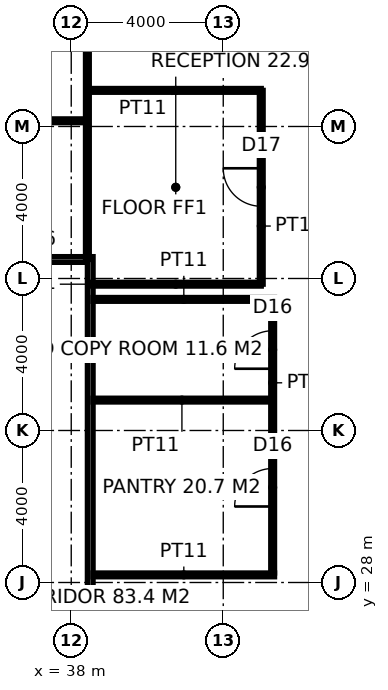
"""IFC4 building model, lengths in metres.
Left out: names, types, materials, properties, quantities, classifications, styles, units other than length and angle.
Written with IfcOpenShell. Run it as: python <this file> out.ifc"""

import sys

from ifc_helpers import new_model, si_unit, direction, frame, frame_2d, origin, place, context, subcontext, project, spatial, rectangle, extrude, element, fill, save


model = new_model("IFC4")
c1 = context("Model", 3, precision=1e-05, world=origin(), true_north=direction((0.0, 1.0)))
c2 = subcontext(c1, "Body", "Model", "MODEL_VIEW")
j1 = project(units=[si_unit("LENGTHUNIT", "METRE"), si_unit("PLANEANGLEUNIT", "RADIAN")], contexts=[c1])
p1 = place(None, origin())
s1 = spatial("IfcSite", under=j1, at=p1, CompositionType="ELEMENT")
p2 = place(p1, origin())
s2 = spatial("IfcBuilding", under=s1, at=p2, CompositionType="ELEMENT")
p3 = place(p2, frame((0.0, 0.0, 214.2)))
s3 = spatial("IfcBuildingStorey", under=s2, at=p3, CompositionType="ELEMENT", Elevation=214.2)
p4 = place(p3, frame((38.5, 15.625, 0.0), z_axis=(0.0, 0.0, 1.0), x_axis=(0.0, 1.0, 0.0)))
e1 = element("IfcWall", 1, at=p4, inside=s3, PredefinedType="PARTITIONING", context=c2, shape_type="SweptSolid", body=[
    extrude(rectangle(XDim=20.95, YDim=0.15, at=frame_2d((10.475, 0.0))), origin(), (0.0, 0.0, 1.0), 3.85),
])
p5 = place(p4, frame((9.575, 0.0, 0.0)))
e2 = element("IfcOpeningElement", 2, at=p5, cuts=e1, PredefinedType="OPENING", context=c2, shape_type="SweptSolid", body=[
    extrude(rectangle(XDim=1.8, YDim=2.4, at=frame_2d((0.9, 1.2))), frame((0.0, 0.085, 0.0), z_axis=(0.0, -1.0, 0.0), x_axis=(1.0, 0.0, 0.0)), (0.0, 0.0, 1.0), 0.17),
])
p6 = place(p3, frame((36.1, 36.5, 0.0), z_axis=(0.0, 0.0, 1.0), x_axis=(1.0, 0.0, 0.0)))
e3 = element("IfcWall", 3, at=p6, inside=s3, PredefinedType="PARTITIONING", context=c2, shape_type="SweptSolid", body=[
    extrude(rectangle(XDim=2.325, YDim=0.15, at=frame_2d((1.163, 0.0))), origin(), (0.0, 0.0, 1.0), 3.85),
])
p7 = place(p3, frame((38.575, 28.2, 0.0), z_axis=(0.0, 0.0, 1.0), x_axis=(1.0, 0.0, 0.0)))
e4 = element("IfcWall", 4, at=p7, inside=s3, PredefinedType="PARTITIONING", context=c2, shape_type="SweptSolid", body=[
    extrude(rectangle(XDim=4.775, YDim=0.1, at=frame_2d((2.388, 0.0))), origin(), (0.0, 0.0, 1.0), 3.85),
])
p8 = place(p3, frame((38.575, 32.8, 0.0), z_axis=(0.0, 0.0, 1.0), x_axis=(1.0, 0.0, 0.0)))
e5 = element("IfcWall", 5, at=p8, inside=s3, PredefinedType="PARTITIONING", context=c2, shape_type="SweptSolid", body=[
    extrude(rectangle(XDim=4.675, YDim=0.1, at=frame_2d((2.337, 0.0))), origin(), (0.0, 0.0, 1.0), 3.85),
])
p9 = place(p3, frame((38.575, 35.45, 0.0), z_axis=(0.0, 0.0, 1.0), x_axis=(1.0, 0.0, 0.0)))
e6 = element("IfcWall", 6, at=p9, inside=s3, PredefinedType="PARTITIONING", context=c2, shape_type="SweptSolid", body=[
    extrude(rectangle(XDim=4.775, YDim=0.1, at=frame_2d((2.388, 0.0))), origin(), (0.0, 0.0, 1.0), 3.85),
])
p10 = place(p3, frame((43.3, 28.25, 0.0), z_axis=(0.0, 0.0, 1.0), x_axis=(0.0, 1.0, 0.0)))
e7 = element("IfcWall", 7, at=p10, inside=s3, PredefinedType="PARTITIONING", context=c2, shape_type="SweptSolid", body=[
    extrude(rectangle(XDim=7.15, YDim=0.1, at=frame_2d((3.575, 0.0))), origin(), (0.0, 0.0, 1.0), 3.85),
])
p11 = place(p10, frame((1.75, 0.0, 0.0)))
e8 = element("IfcOpeningElement", 8, at=p11, cuts=e7, PredefinedType="OPENING", context=c2, shape_type="SweptSolid", body=[
    extrude(rectangle(XDim=1.0, YDim=2.2, at=frame_2d((0.5, 1.1))), frame((0.0, 0.06, 0.0), z_axis=(0.0, -1.0, 0.0), x_axis=(1.0, 0.0, 0.0)), (0.0, 0.0, 1.0), 0.12),
])
p12 = place(p10, frame((5.375, 0.0, 0.0)))
e9 = element("IfcOpeningElement", 9, at=p12, cuts=e7, PredefinedType="OPENING", context=c2, shape_type="SweptSolid", body=[
    extrude(rectangle(XDim=1.0, YDim=2.2, at=frame_2d((0.5, 1.1))), frame((0.0, 0.06, 0.0), z_axis=(0.0, -1.0, 0.0), x_axis=(1.0, 0.0, 0.0)), (0.0, 0.0, 1.0), 0.12),
])
p13 = place(p3, frame((38.425, 51.45, 0.0), z_axis=(0.0, 0.0, 1.0), x_axis=(0.0, -1.0, 0.0)))
e10 = element("IfcWall", 10, at=p13, inside=s3, PredefinedType="PARTITIONING", context=c2, shape_type="SweptSolid", body=[
    extrude(rectangle(XDim=14.95, YDim=0.1, at=frame_2d((7.475, 0.0))), origin(), (0.0, 0.0, 1.0), 2.95),
])
p14 = place(p13, frame((6.975, 0.0, 0.0)))
e11 = element("IfcOpeningElement", 11, at=p14, cuts=e10, PredefinedType="OPENING", context=c2, shape_type="SweptSolid", body=[
    extrude(rectangle(XDim=1.0, YDim=2.2, at=frame_2d((0.5, 1.1))), frame((0.0, 0.06, 0.0), z_axis=(0.0, -1.0, 0.0), x_axis=(1.0, 0.0, 0.0)), (0.0, 0.0, 1.0), 0.12),
])
p15 = place(p3, frame((34.0, 40.15, 0.0), z_axis=(0.0, 0.0, 1.0), x_axis=(1.0, 0.0, 0.0)))
e12 = element("IfcWall", 12, at=p15, inside=s3, PredefinedType="PARTITIONING", context=c2, shape_type="SweptSolid", body=[
    extrude(rectangle(XDim=4.425, YDim=0.1, at=frame_2d((2.212, 0.0))), origin(), (0.0, 0.0, 1.0), 3.85),
])
p16 = place(p3, frame((38.5, 35.85, 0.0), z_axis=(0.0, 0.0, 1.0), x_axis=(1.0, 0.0, 0.0)))
e13 = element("IfcWall", 13, at=p16, inside=s3, PredefinedType="PARTITIONING", context=c2, shape_type="SweptSolid", body=[
    extrude(rectangle(XDim=4.5, YDim=0.1, at=frame_2d((2.25, 0.0))), origin(), (0.0, 0.0, 1.0), 2.95),
])
p17 = place(p3, frame((43.0, 35.85, 0.0), z_axis=(0.0, 0.0, 1.0), x_axis=(0.0, 1.0, 0.0)))
e14 = element("IfcWall", 14, at=p17, inside=s3, PredefinedType="PARTITIONING", context=c2, shape_type="SweptSolid", body=[
    extrude(rectangle(XDim=5.1, YDim=0.1, at=frame_2d((2.55, 0.0))), origin(), (0.0, 0.0, 1.0), 3.85),
])
p18 = place(p17, frame((2.05, 0.0, 0.0)))
e15 = element("IfcOpeningElement", 15, at=p18, cuts=e14, PredefinedType="OPENING", context=c2, shape_type="SweptSolid", body=[
    extrude(rectangle(XDim=1.0, YDim=2.2, at=frame_2d((0.5, 1.1))), frame((0.0, 0.06, 0.0), z_axis=(0.0, -1.0, 0.0), x_axis=(1.0, 0.0, 0.0)), (0.0, 0.0, 1.0), 0.12),
])
p19 = place(p3, frame((43.0, 40.95, 0.0), z_axis=(0.0, 0.0, 1.0), x_axis=(-1.0, 0.0, 0.0)))
e16 = element("IfcWall", 16, at=p19, inside=s3, PredefinedType="PARTITIONING", context=c2, shape_type="SweptSolid", body=[
    extrude(rectangle(XDim=4.5, YDim=0.1, at=frame_2d((2.25, 0.0))), origin(), (0.0, 0.0, 1.0), 3.85),
])
p20 = place(p11, origin())
e17 = element("IfcDoor", 17, at=p20, inside=s3, OperationType="SINGLE_SWING_LEFT", PredefinedType="DOOR", context=c2, shape_type="SweptSolid", body=[
    extrude(rectangle(XDim=1.0, YDim=2.2, at=frame_2d((0.5, 1.1))), frame((0.0, 0.025, 0.0), z_axis=(0.0, -1.0, 0.0), x_axis=(1.0, 0.0, 0.0)), (0.0, 0.0, 1.0), 0.05),
])
fill(e8, e17)
p21 = place(p12, origin())
e18 = element("IfcDoor", 18, at=p21, inside=s3, OperationType="SINGLE_SWING_LEFT", PredefinedType="DOOR", context=c2, shape_type="SweptSolid", body=[
    extrude(rectangle(XDim=1.0, YDim=2.2, at=frame_2d((0.5, 1.1))), frame((0.0, 0.025, 0.0), z_axis=(0.0, -1.0, 0.0), x_axis=(1.0, 0.0, 0.0)), (0.0, 0.0, 1.0), 0.05),
])
fill(e9, e18)
p22 = place(p18, origin())
e19 = element("IfcDoor", 19, at=p22, inside=s3, OperationType="SINGLE_SWING_RIGHT", PredefinedType="DOOR", context=c2, shape_type="SweptSolid", body=[
    extrude(rectangle(XDim=1.0, YDim=2.2, at=frame_2d((0.5, 1.1))), frame((0.0, 0.025, 0.0), z_axis=(0.0, -1.0, 0.0), x_axis=(1.0, 0.0, 0.0)), (0.0, 0.0, 1.0), 0.05),
])
fill(e15, e19)
save(model, sys.argv[1])
